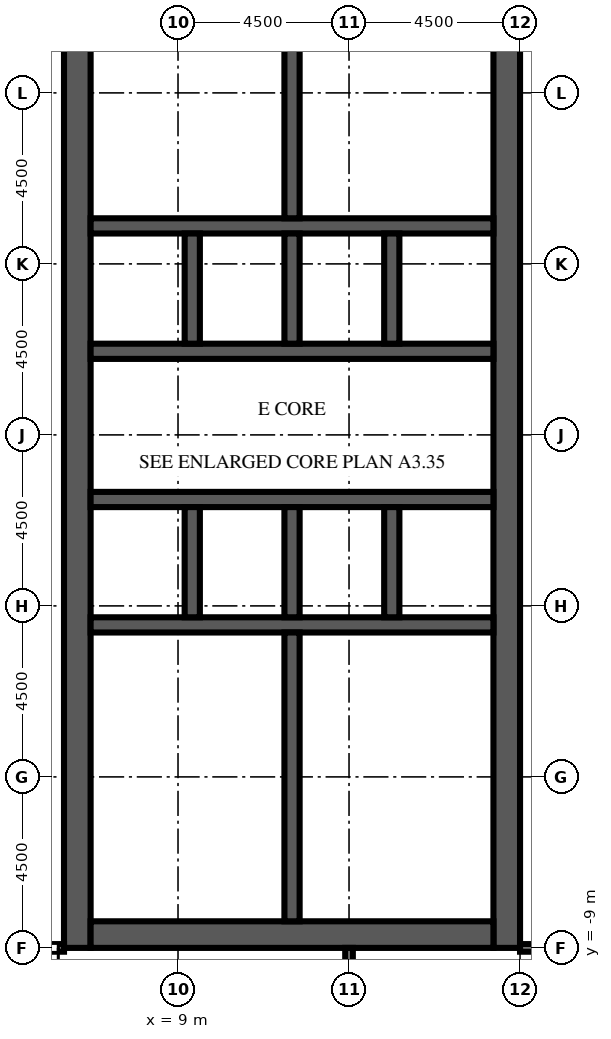
"""IFC4 building model, lengths in metres.
Left out: names, types, materials, properties, quantities, classifications, styles, units other than length and angle.
Written with IfcOpenShell. Run it as: python <this file> out.ifc"""

import sys

from ifc_helpers import new_model, si_unit, direction, frame, frame_2d, origin, place, context, subcontext, project, spatial, rectangle, extrude, element, fill, save


model = new_model("IFC4")
c1 = context("Model", 3, precision=1e-05, world=origin(), true_north=direction((0.0, 1.0)))
c2 = subcontext(c1, "Body", "Model", "MODEL_VIEW")
j1 = project(units=[si_unit("LENGTHUNIT", "METRE"), si_unit("PLANEANGLEUNIT", "RADIAN")], contexts=[c1])
p1 = place(None, origin())
s1 = spatial("IfcSite", under=j1, at=p1, CompositionType="ELEMENT")
p2 = place(p1, origin())
s2 = spatial("IfcBuilding", under=s1, at=p2, CompositionType="ELEMENT")
p3 = place(p2, frame((0.0, 0.0, 235.7)))
s3 = spatial("IfcBuildingStorey", under=s2, at=p3, CompositionType="ELEMENT", Elevation=235.7)
p4 = place(p3, frame((6.35, -9.0, 0.0), z_axis=(0.0, 0.0, 1.0), x_axis=(0.0, 1.0, 0.0)))
e1 = element("IfcWall", 1, at=p4, inside=s3, PredefinedType="SHEAR", context=c2, shape_type="SweptSolid", body=[
    extrude(rectangle(XDim=27.5, YDim=0.7, at=frame_2d((13.75, 0.0))), origin(), (0.0, 0.0, 1.0), 4.1),
])
p5 = place(p4, frame((12.55, 0.0, 0.0)))
e2 = element("IfcOpeningElement", 2, at=p5, cuts=e1, PredefinedType="OPENING", context=c2, shape_type="SweptSolid", body=[
    extrude(rectangle(XDim=2.4, YDim=2.4, at=frame_2d((1.2, 1.2))), frame((0.0, 0.36, 0.0), z_axis=(0.0, -1.0, 0.0), x_axis=(1.0, 0.0, 0.0)), (0.0, 0.0, 1.0), 0.72),
])
p6 = place(p4, frame((5.42, 0.0, 0.0)))
e3 = element("IfcOpeningElement", 3, at=p6, cuts=e1, PredefinedType="OPENING", context=c2, shape_type="SweptSolid", body=[
    extrude(rectangle(XDim=1.2, YDim=2.1, at=frame_2d((0.6, 1.05))), frame((0.0, 0.36, 0.0), z_axis=(0.0, -1.0, 0.0), x_axis=(1.0, 0.0, 0.0)), (0.0, 0.0, 1.0), 0.72),
])
p7 = place(p4, frame((19.46, 0.0, 0.0)))
e4 = element("IfcOpeningElement", 4, at=p7, cuts=e1, PredefinedType="OPENING", context=c2, shape_type="SweptSolid", body=[
    extrude(rectangle(XDim=1.0, YDim=2.1, at=frame_2d((0.5, 1.05))), frame((0.0, 0.36, 0.0), z_axis=(0.0, -1.0, 0.0), x_axis=(1.0, 0.0, 0.0)), (0.0, 0.0, 1.0), 0.72),
])
p8 = place(p4, frame((21.17, 0.0, 0.0)))
e5 = element("IfcOpeningElement", 5, at=p8, cuts=e1, PredefinedType="OPENING", context=c2, shape_type="SweptSolid", body=[
    extrude(rectangle(XDim=1.0, YDim=2.1, at=frame_2d((0.5, 1.05))), frame((0.0, 0.36, 0.0), z_axis=(0.0, -1.0, 0.0), x_axis=(1.0, 0.0, 0.0)), (0.0, 0.0, 1.0), 0.72),
])
p9 = place(p4, frame((23.26, 0.0, 0.0)))
e6 = element("IfcOpeningElement", 6, at=p9, cuts=e1, PredefinedType="OPENING", context=c2, shape_type="SweptSolid", body=[
    extrude(rectangle(XDim=1.0, YDim=2.1, at=frame_2d((0.5, 1.05))), frame((0.0, 0.36, 0.0), z_axis=(0.0, -1.0, 0.0), x_axis=(1.0, 0.0, 0.0)), (0.0, 0.0, 1.0), 0.72),
])
p10 = place(p4, frame((25.35, 0.0, 0.0)))
e7 = element("IfcOpeningElement", 7, at=p10, cuts=e1, PredefinedType="OPENING", context=c2, shape_type="SweptSolid", body=[
    extrude(rectangle(XDim=1.0, YDim=2.1, at=frame_2d((0.5, 1.05))), frame((0.0, 0.36, 0.0), z_axis=(0.0, -1.0, 0.0), x_axis=(1.0, 0.0, 0.0)), (0.0, 0.0, 1.0), 0.72),
])
p11 = place(p3, frame((17.65, -9.0, 0.0), z_axis=(0.0, 0.0, 1.0), x_axis=(0.0, 1.0, 0.0)))
e8 = element("IfcWall", 8, at=p11, inside=s3, PredefinedType="SHEAR", context=c2, shape_type="SweptSolid", body=[
    extrude(rectangle(XDim=27.5, YDim=0.7, at=frame_2d((13.75, 0.0))), origin(), (0.0, 0.0, 1.0), 4.1),
])
p12 = place(p11, frame((12.55, 0.0, 0.0)))
e9 = element("IfcOpeningElement", 9, at=p12, cuts=e8, PredefinedType="OPENING", context=c2, shape_type="SweptSolid", body=[
    extrude(rectangle(XDim=2.4, YDim=2.4, at=frame_2d((1.2, 1.2))), frame((0.0, 0.36, 0.0), z_axis=(0.0, -1.0, 0.0), x_axis=(1.0, 0.0, 0.0)), (0.0, 0.0, 1.0), 0.72),
])
p13 = place(p11, frame((6.825, 0.0, 0.0)))
e10 = element("IfcOpeningElement", 10, at=p13, cuts=e8, PredefinedType="OPENING", context=c2, shape_type="SweptSolid", body=[
    extrude(rectangle(XDim=1.2, YDim=2.1, at=frame_2d((0.6, 1.05))), frame((0.0, 0.36, 0.0), z_axis=(0.0, -1.0, 0.0), x_axis=(1.0, 0.0, 0.0)), (0.0, 0.0, 1.0), 0.72),
])
p14 = place(p11, frame((19.475, 0.0, 0.0)))
e11 = element("IfcOpeningElement", 11, at=p14, cuts=e8, PredefinedType="OPENING", context=c2, shape_type="SweptSolid", body=[
    extrude(rectangle(XDim=1.2, YDim=2.1, at=frame_2d((0.6, 1.05))), frame((0.0, 0.36, 0.0), z_axis=(0.0, -1.0, 0.0), x_axis=(1.0, 0.0, 0.0)), (0.0, 0.0, 1.0), 0.72),
])
p15 = place(p3, frame((6.7, -8.65, 0.0), z_axis=(0.0, 0.0, 1.0), x_axis=(1.0, 0.0, 0.0)))
e12 = element("IfcWall", 12, at=p15, inside=s3, PredefinedType="SHEAR", context=c2, shape_type="SweptSolid", body=[
    extrude(rectangle(XDim=10.6, YDim=0.7, at=frame_2d((5.3, 0.0))), origin(), (0.0, 0.0, 1.0), 4.1),
])
p16 = place(p3, frame((6.7, -0.5, 0.0), z_axis=(0.0, 0.0, 1.0), x_axis=(1.0, 0.0, 0.0)))
e13 = element("IfcWall", 13, at=p16, inside=s3, PredefinedType="SHEAR", context=c2, shape_type="SweptSolid", body=[
    extrude(rectangle(XDim=10.6, YDim=0.4, at=frame_2d((5.3, 0.0))), origin(), (0.0, 0.0, 1.0), 4.1),
])
p17 = place(p3, frame((6.7, 2.8, 0.0), z_axis=(0.0, 0.0, 1.0), x_axis=(1.0, 0.0, 0.0)))
e14 = element("IfcWall", 14, at=p17, inside=s3, PredefinedType="SHEAR", context=c2, shape_type="SweptSolid", body=[
    extrude(rectangle(XDim=10.6, YDim=0.4, at=frame_2d((5.3, 0.0))), origin(), (0.0, 0.0, 1.0), 4.1),
])
p18 = place(p17, frame((0.688, 0.0, 0.0)))
e15 = element("IfcOpeningElement", 15, at=p18, cuts=e14, PredefinedType="OPENING", context=c2, shape_type="SweptSolid", body=[
    extrude(rectangle(XDim=1.1, YDim=2.1, at=frame_2d((0.55, 1.05))), frame((0.0, 0.21, 0.0), z_axis=(0.0, -1.0, 0.0), x_axis=(1.0, 0.0, 0.0)), (0.0, 0.0, 1.0), 0.42),
])
p19 = place(p17, frame((3.438, 0.0, 0.0)))
e16 = element("IfcOpeningElement", 16, at=p19, cuts=e14, PredefinedType="OPENING", context=c2, shape_type="SweptSolid", body=[
    extrude(rectangle(XDim=1.1, YDim=2.1, at=frame_2d((0.55, 1.05))), frame((0.0, 0.21, 0.0), z_axis=(0.0, -1.0, 0.0), x_axis=(1.0, 0.0, 0.0)), (0.0, 0.0, 1.0), 0.42),
])
p20 = place(p17, frame((6.113, 0.0, 0.0)))
e17 = element("IfcOpeningElement", 17, at=p20, cuts=e14, PredefinedType="OPENING", context=c2, shape_type="SweptSolid", body=[
    extrude(rectangle(XDim=1.0, YDim=2.1, at=frame_2d((0.5, 1.05))), frame((0.0, 0.21, 0.0), z_axis=(0.0, -1.0, 0.0), x_axis=(1.0, 0.0, 0.0)), (0.0, 0.0, 1.0), 0.42),
])
p21 = place(p17, frame((8.863, 0.0, 0.0)))
e18 = element("IfcOpeningElement", 18, at=p21, cuts=e14, PredefinedType="OPENING", context=c2, shape_type="SweptSolid", body=[
    extrude(rectangle(XDim=1.0, YDim=2.1, at=frame_2d((0.5, 1.05))), frame((0.0, 0.21, 0.0), z_axis=(0.0, -1.0, 0.0), x_axis=(1.0, 0.0, 0.0)), (0.0, 0.0, 1.0), 0.42),
])
p22 = place(p3, frame((6.7, 6.7, 0.0), z_axis=(0.0, 0.0, 1.0), x_axis=(1.0, 0.0, 0.0)))
e19 = element("IfcWall", 19, at=p22, inside=s3, PredefinedType="SHEAR", context=c2, shape_type="SweptSolid", body=[
    extrude(rectangle(XDim=10.6, YDim=0.4, at=frame_2d((5.3, 0.0))), origin(), (0.0, 0.0, 1.0), 4.1),
])
p23 = place(p22, frame((3.438, 0.0, 0.0)))
e20 = element("IfcOpeningElement", 20, at=p23, cuts=e19, PredefinedType="OPENING", context=c2, shape_type="SweptSolid", body=[
    extrude(rectangle(XDim=1.1, YDim=2.1, at=frame_2d((0.55, 1.05))), frame((0.0, 0.21, 0.0), z_axis=(0.0, -1.0, 0.0), x_axis=(1.0, 0.0, 0.0)), (0.0, 0.0, 1.0), 0.42),
])
p24 = place(p22, frame((6.062, 0.0, 0.0)))
e21 = element("IfcOpeningElement", 21, at=p24, cuts=e19, PredefinedType="OPENING", context=c2, shape_type="SweptSolid", body=[
    extrude(rectangle(XDim=1.1, YDim=2.1, at=frame_2d((0.55, 1.05))), frame((0.0, 0.21, 0.0), z_axis=(0.0, -1.0, 0.0), x_axis=(1.0, 0.0, 0.0)), (0.0, 0.0, 1.0), 0.42),
])
p25 = place(p22, frame((8.812, 0.0, 0.0)))
e22 = element("IfcOpeningElement", 22, at=p25, cuts=e19, PredefinedType="OPENING", context=c2, shape_type="SweptSolid", body=[
    extrude(rectangle(XDim=1.1, YDim=2.1, at=frame_2d((0.55, 1.05))), frame((0.0, 0.21, 0.0), z_axis=(0.0, -1.0, 0.0), x_axis=(1.0, 0.0, 0.0)), (0.0, 0.0, 1.0), 0.42),
])
p26 = place(p22, frame((0.738, 0.0, 0.0)))
e23 = element("IfcOpeningElement", 23, at=p26, cuts=e19, PredefinedType="OPENING", context=c2, shape_type="SweptSolid", body=[
    extrude(rectangle(XDim=1.0, YDim=2.1, at=frame_2d((0.5, 1.05))), frame((0.0, 0.21, 0.0), z_axis=(0.0, -1.0, 0.0), x_axis=(1.0, 0.0, 0.0)), (0.0, 0.0, 1.0), 0.42),
])
p27 = place(p3, frame((6.7, 10.0, 0.0), z_axis=(0.0, 0.0, 1.0), x_axis=(1.0, 0.0, 0.0)))
e24 = element("IfcWall", 24, at=p27, inside=s3, PredefinedType="SHEAR", context=c2, shape_type="SweptSolid", body=[
    extrude(rectangle(XDim=10.6, YDim=0.4, at=frame_2d((5.3, 0.0))), origin(), (0.0, 0.0, 1.0), 4.1),
])
for number, where, z_axis, x_axis in (
    (25, (9.375, -0.3, 0.0), (0.0, 0.0, 1.0), (0.0, 1.0, 0.0)),
    (26, (9.375, 6.9, 0.0), (0.0, 0.0, 1.0), (0.0, 1.0, 0.0)),
    (27, (12.0, -0.3, 0.0), (0.0, 0.0, 1.0), (0.0, 1.0, 0.0)),
    (28, (12.0, 6.9, 0.0), (0.0, 0.0, 1.0), (0.0, 1.0, 0.0)),
    (29, (14.625, -0.3, 0.0), (0.0, 0.0, 1.0), (0.0, 1.0, 0.0)),
    (30, (14.625, 6.9, 0.0), (0.0, 0.0, 1.0), (0.0, 1.0, 0.0)),
):
    element("IfcWall", number, at=place(p3, frame(where, z_axis=z_axis, x_axis=x_axis)), inside=s3, PredefinedType="SHEAR", context=c2, shape_type="SweptSolid", body=[
        extrude(rectangle(XDim=2.9, YDim=0.4, at=frame_2d((1.45, 0.0))), origin(), (0.0, 0.0, 1.0), 4.1),
    ])
for number, where, z_axis, x_axis in (
    (31, (12.0, -8.3, 0.0), (0.0, 0.0, 1.0), (0.0, 1.0, 0.0)),
    (32, (12.0, 10.2, 0.0), (0.0, 0.0, 1.0), (0.0, 1.0, 0.0)),
):
    element("IfcWall", number, at=place(p3, frame(where, z_axis=z_axis, x_axis=x_axis)), inside=s3, PredefinedType="SHEAR", context=c2, shape_type="SweptSolid", body=[
        extrude(rectangle(XDim=7.6, YDim=0.4, at=frame_2d((3.8, 0.0))), origin(), (0.0, 0.0, 1.0), 4.1),
    ])
p28 = place(p3, frame((6.7, -5.26, 0.0), z_axis=(0.0, 0.0, 1.0), x_axis=(1.0, 0.0, 0.0)))
e33 = element("IfcWall", 33, at=p28, inside=s3, PredefinedType="PARTITIONING", context=c2, shape_type="SweptSolid", body=[
    extrude(rectangle(XDim=1.5, YDim=0.1, at=frame_2d((0.75, 0.0))), origin(), (0.0, 0.0, 1.0), 3.65),
])
p29 = place(p28, frame((0.25, 0.0, 0.0)))
e34 = element("IfcOpeningElement", 34, at=p29, cuts=e33, PredefinedType="OPENING", context=c2, shape_type="SweptSolid", body=[
    extrude(rectangle(XDim=1.0, YDim=2.1, at=frame_2d((0.5, 1.05))), frame((0.0, 0.06, 0.0), z_axis=(0.0, -1.0, 0.0), x_axis=(1.0, 0.0, 0.0)), (0.0, 0.0, 1.0), 0.12),
])
p30 = place(p3, frame((8.2, -5.26, 0.0), z_axis=(0.0, 0.0, 1.0), x_axis=(0.0, 1.0, 0.0)))
e35 = element("IfcWall", 35, at=p30, inside=s3, PredefinedType="PARTITIONING", context=c2, shape_type="SweptSolid", body=[
    extrude(rectangle(XDim=2.28, YDim=0.1, at=frame_2d((1.14, 0.0))), origin(), (0.0, 0.0, 1.0), 3.65),
])
p31 = place(p30, frame((0.64, 0.0, 0.0)))
e36 = element("IfcOpeningElement", 36, at=p31, cuts=e35, PredefinedType="OPENING", context=c2, shape_type="SweptSolid", body=[
    extrude(rectangle(XDim=1.0, YDim=2.1, at=frame_2d((0.5, 1.05))), frame((0.0, 0.06, 0.0), z_axis=(0.0, -1.0, 0.0), x_axis=(1.0, 0.0, 0.0)), (0.0, 0.0, 1.0), 0.12),
])
p32 = place(p3, frame((8.2, -2.98, 0.0), z_axis=(0.0, 0.0, 1.0), x_axis=(0.0, 1.0, 0.0)))
e37 = element("IfcWall", 37, at=p32, inside=s3, PredefinedType="PARTITIONING", context=c2, shape_type="SweptSolid", body=[
    extrude(rectangle(XDim=2.28, YDim=0.1, at=frame_2d((1.14, 0.0))), origin(), (0.0, 0.0, 1.0), 3.65),
])
p33 = place(p32, frame((0.64, 0.0, 0.0)))
e38 = element("IfcOpeningElement", 38, at=p33, cuts=e37, PredefinedType="OPENING", context=c2, shape_type="SweptSolid", body=[
    extrude(rectangle(XDim=1.0, YDim=2.1, at=frame_2d((0.5, 1.05))), frame((0.0, 0.06, 0.0), z_axis=(0.0, -1.0, 0.0), x_axis=(1.0, 0.0, 0.0)), (0.0, 0.0, 1.0), 0.12),
])
for number, where, z_axis, x_axis in (
    (39, (8.2, -5.26, 0.0), (0.0, 0.0, 1.0), (1.0, 0.0, 0.0)),
    (40, (8.2, -2.98, 0.0), (0.0, 0.0, 1.0), (1.0, 0.0, 0.0)),
):
    element("IfcWall", number, at=place(p3, frame(where, z_axis=z_axis, x_axis=x_axis)), inside=s3, PredefinedType="PARTITIONING", context=c2, shape_type="SweptSolid", body=[
        extrude(rectangle(XDim=3.6, YDim=0.1, at=frame_2d((1.8, 0.0))), origin(), (0.0, 0.0, 1.0), 3.65),
    ])
for number, where, z_axis, x_axis in (
    (41, (6.7, 11.72, 0.0), (0.0, 0.0, 1.0), (1.0, 0.0, 0.0)),
    (42, (6.7, 13.62, 0.0), (0.0, 0.0, 1.0), (1.0, 0.0, 0.0)),
):
    element("IfcWall", number, at=place(p3, frame(where, z_axis=z_axis, x_axis=x_axis)), inside=s3, PredefinedType="PARTITIONING", context=c2, shape_type="SweptSolid", body=[
        extrude(rectangle(XDim=5.1, YDim=0.1, at=frame_2d((2.55, 0.0))), origin(), (0.0, 0.0, 1.0), 3.65),
    ])
p34 = place(p3, frame((13.5, -22.1, 0.0), z_axis=(0.0, 0.0, 1.0), x_axis=(0.0, 1.0, 0.0)))
e43 = element("IfcWall", 43, at=p34, inside=s3, PredefinedType="PARTITIONING", context=c2, shape_type="SweptSolid", body=[
    extrude(rectangle(XDim=13.1, YDim=0.2, at=frame_2d((6.55, 0.0))), origin(), (0.0, 0.0, 1.0), 3.65),
])
p35 = place(p3, frame((6.0, -9.0, 0.0), z_axis=(0.0, 0.0, 1.0), x_axis=(-1.0, 0.0, 0.0)))
e44 = element("IfcWall", 44, at=p35, inside=s3, PredefinedType="PARTITIONING", context=c2, shape_type="SweptSolid", body=[
    extrude(rectangle(XDim=4.5, YDim=0.2, at=frame_2d((2.25, 0.0))), origin(), (0.0, 0.0, 1.0), 3.65),
])
p36 = place(p35, frame((1.9, 0.0, 0.0)))
e45 = element("IfcOpeningElement", 45, at=p36, cuts=e44, PredefinedType="OPENING", context=c2, shape_type="SweptSolid", body=[
    extrude(rectangle(XDim=1.0, YDim=2.1, at=frame_2d((0.5, 1.05))), frame((0.0, 0.11, 0.0), z_axis=(0.0, -1.0, 0.0), x_axis=(1.0, 0.0, 0.0)), (0.0, 0.0, 1.0), 0.22),
])
p37 = place(p35, frame((0.15, 0.0, 0.0)))
e46 = element("IfcOpeningElement", 46, at=p37, cuts=e44, PredefinedType="OPENING", context=c2, shape_type="SweptSolid", body=[
    extrude(rectangle(XDim=1.0, YDim=2.1, at=frame_2d((0.5, 1.05))), frame((0.0, 0.11, 0.0), z_axis=(0.0, -1.0, 0.0), x_axis=(1.0, 0.0, 0.0)), (0.0, 0.0, 1.0), 0.22),
])
p38 = place(p3, frame((21.0, -9.0, 0.0), z_axis=(0.0, 0.0, 1.0), x_axis=(-1.0, 0.0, 0.0)))
e47 = element("IfcWall", 47, at=p38, inside=s3, PredefinedType="PARTITIONING", context=c2, shape_type="SweptSolid", body=[
    extrude(rectangle(XDim=3.0, YDim=0.2, at=frame_2d((1.5, 0.0))), origin(), (0.0, 0.0, 1.0), 3.65),
])
p39 = place(p38, frame((1.4, 0.0, 0.0)))
e48 = element("IfcOpeningElement", 48, at=p39, cuts=e47, PredefinedType="OPENING", context=c2, shape_type="SweptSolid", body=[
    extrude(rectangle(XDim=1.0, YDim=2.1, at=frame_2d((0.5, 1.05))), frame((0.0, 0.11, 0.0), z_axis=(0.0, -1.0, 0.0), x_axis=(1.0, 0.0, 0.0)), (0.0, 0.0, 1.0), 0.22),
])
p40 = place(p18, origin())
e49 = element("IfcDoor", 49, at=p40, inside=s3, OperationType="DOUBLE_DOOR_SLIDING", PredefinedType="DOOR", context=c2, shape_type="SweptSolid", body=[
    extrude(rectangle(XDim=1.1, YDim=2.1, at=frame_2d((0.55, 1.05))), frame((0.0, 0.025, 0.0), z_axis=(0.0, -1.0, 0.0), x_axis=(1.0, 0.0, 0.0)), (0.0, 0.0, 1.0), 0.05),
])
fill(e15, e49)
p41 = place(p19, origin())
e50 = element("IfcDoor", 50, at=p41, inside=s3, OperationType="DOUBLE_DOOR_SLIDING", PredefinedType="DOOR", context=c2, shape_type="SweptSolid", body=[
    extrude(rectangle(XDim=1.1, YDim=2.1, at=frame_2d((0.55, 1.05))), frame((0.0, 0.025, 0.0), z_axis=(0.0, -1.0, 0.0), x_axis=(1.0, 0.0, 0.0)), (0.0, 0.0, 1.0), 0.05),
])
fill(e16, e50)
p42 = place(p23, origin())
e51 = element("IfcDoor", 51, at=p42, inside=s3, OperationType="DOUBLE_DOOR_SLIDING", PredefinedType="DOOR", context=c2, shape_type="SweptSolid", body=[
    extrude(rectangle(XDim=1.1, YDim=2.1, at=frame_2d((0.55, 1.05))), frame((0.0, 0.025, 0.0), z_axis=(0.0, -1.0, 0.0), x_axis=(1.0, 0.0, 0.0)), (0.0, 0.0, 1.0), 0.05),
])
fill(e20, e51)
p43 = place(p24, origin())
e52 = element("IfcDoor", 52, at=p43, inside=s3, OperationType="DOUBLE_DOOR_SLIDING", PredefinedType="DOOR", context=c2, shape_type="SweptSolid", body=[
    extrude(rectangle(XDim=1.1, YDim=2.1, at=frame_2d((0.55, 1.05))), frame((0.0, 0.025, 0.0), z_axis=(0.0, -1.0, 0.0), x_axis=(1.0, 0.0, 0.0)), (0.0, 0.0, 1.0), 0.05),
])
fill(e21, e52)
p44 = place(p25, origin())
e53 = element("IfcDoor", 53, at=p44, inside=s3, OperationType="DOUBLE_DOOR_SLIDING", PredefinedType="DOOR", context=c2, shape_type="SweptSolid", body=[
    extrude(rectangle(XDim=1.1, YDim=2.1, at=frame_2d((0.55, 1.05))), frame((0.0, 0.025, 0.0), z_axis=(0.0, -1.0, 0.0), x_axis=(1.0, 0.0, 0.0)), (0.0, 0.0, 1.0), 0.05),
])
fill(e22, e53)
p45 = place(p5, origin())
e54 = element("IfcDoor", 54, at=p45, inside=s3, OperationType="DOUBLE_DOOR_DOUBLE_SWING", PredefinedType="DOOR", context=c2, shape_type="SweptSolid", body=[
    extrude(rectangle(XDim=2.4, YDim=2.4, at=frame_2d((1.2, 1.2))), frame((0.0, 0.025, 0.0), z_axis=(0.0, -1.0, 0.0), x_axis=(1.0, 0.0, 0.0)), (0.0, 0.0, 1.0), 0.05),
])
fill(e2, e54)
p46 = place(p12, origin())
e55 = element("IfcDoor", 55, at=p46, inside=s3, OperationType="DOUBLE_DOOR_DOUBLE_SWING", PredefinedType="DOOR", context=c2, shape_type="SweptSolid", body=[
    extrude(rectangle(XDim=2.4, YDim=2.4, at=frame_2d((1.2, 1.2))), frame((0.0, 0.025, 0.0), z_axis=(0.0, -1.0, 0.0), x_axis=(1.0, 0.0, 0.0)), (0.0, 0.0, 1.0), 0.05),
])
fill(e9, e55)
p47 = place(p13, frame((1.2, 0.0, 0.0), z_axis=(0.0, 0.0, 1.0), x_axis=(-1.0, 0.0, 0.0)))
e56 = element("IfcDoor", 56, at=p47, inside=s3, OperationType="SINGLE_SWING_LEFT", PredefinedType="DOOR", context=c2, shape_type="SweptSolid", body=[
    extrude(rectangle(XDim=1.2, YDim=2.1, at=frame_2d((0.6, 1.05))), frame((0.0, 0.025, 0.0), z_axis=(0.0, -1.0, 0.0), x_axis=(1.0, 0.0, 0.0)), (0.0, 0.0, 1.0), 0.05),
])
fill(e10, e56)
p48 = place(p14, frame((1.2, 0.0, 0.0), z_axis=(0.0, 0.0, 1.0), x_axis=(-1.0, 0.0, 0.0)))
e57 = element("IfcDoor", 57, at=p48, inside=s3, OperationType="SINGLE_SWING_LEFT", PredefinedType="DOOR", context=c2, shape_type="SweptSolid", body=[
    extrude(rectangle(XDim=1.2, YDim=2.1, at=frame_2d((0.6, 1.05))), frame((0.0, 0.025, 0.0), z_axis=(0.0, -1.0, 0.0), x_axis=(1.0, 0.0, 0.0)), (0.0, 0.0, 1.0), 0.05),
])
fill(e11, e57)
p49 = place(p20, origin())
e58 = element("IfcDoor", 58, at=p49, inside=s3, OperationType="SINGLE_SWING_LEFT", PredefinedType="DOOR", context=c2, shape_type="SweptSolid", body=[
    extrude(rectangle(XDim=1.0, YDim=2.1, at=frame_2d((0.5, 1.05))), frame((0.0, 0.025, 0.0), z_axis=(0.0, -1.0, 0.0), x_axis=(1.0, 0.0, 0.0)), (0.0, 0.0, 1.0), 0.05),
])
fill(e17, e58)
p50 = place(p21, origin())
e59 = element("IfcDoor", 59, at=p50, inside=s3, OperationType="SINGLE_SWING_RIGHT", PredefinedType="DOOR", context=c2, shape_type="SweptSolid", body=[
    extrude(rectangle(XDim=1.0, YDim=2.1, at=frame_2d((0.5, 1.05))), frame((0.0, 0.025, 0.0), z_axis=(0.0, -1.0, 0.0), x_axis=(1.0, 0.0, 0.0)), (0.0, 0.0, 1.0), 0.05),
])
fill(e18, e59)
p51 = place(p26, origin())
e60 = element("IfcDoor", 60, at=p51, inside=s3, OperationType="SINGLE_SWING_LEFT", PredefinedType="DOOR", context=c2, shape_type="SweptSolid", body=[
    extrude(rectangle(XDim=1.0, YDim=2.1, at=frame_2d((0.5, 1.05))), frame((0.0, 0.025, 0.0), z_axis=(0.0, -1.0, 0.0), x_axis=(1.0, 0.0, 0.0)), (0.0, 0.0, 1.0), 0.05),
])
fill(e23, e60)
p52 = place(p6, origin())
e61 = element("IfcDoor", 61, at=p52, inside=s3, OperationType="SINGLE_SWING_RIGHT", PredefinedType="DOOR", context=c2, shape_type="SweptSolid", body=[
    extrude(rectangle(XDim=1.2, YDim=2.1, at=frame_2d((0.6, 1.05))), frame((0.0, -0.275, 0.0), z_axis=(0.0, -1.0, 0.0), x_axis=(1.0, 0.0, 0.0)), (0.0, 0.0, 1.0), 0.05),
])
fill(e3, e61)
p53 = place(p29, origin())
e62 = element("IfcDoor", 62, at=p53, inside=s3, OperationType="SINGLE_SWING_LEFT", PredefinedType="DOOR", context=c2, shape_type="SweptSolid", body=[
    extrude(rectangle(XDim=1.0, YDim=2.1, at=frame_2d((0.5, 1.05))), frame((0.0, 0.025, 0.0), z_axis=(0.0, -1.0, 0.0), x_axis=(1.0, 0.0, 0.0)), (0.0, 0.0, 1.0), 0.05),
])
fill(e34, e62)
p54 = place(p31, origin())
e63 = element("IfcDoor", 63, at=p54, inside=s3, OperationType="SINGLE_SWING_RIGHT", PredefinedType="DOOR", context=c2, shape_type="SweptSolid", body=[
    extrude(rectangle(XDim=1.0, YDim=2.1, at=frame_2d((0.5, 1.05))), frame((0.0, 0.025, 0.0), z_axis=(0.0, -1.0, 0.0), x_axis=(1.0, 0.0, 0.0)), (0.0, 0.0, 1.0), 0.05),
])
fill(e36, e63)
p55 = place(p33, origin())
e64 = element("IfcDoor", 64, at=p55, inside=s3, OperationType="SINGLE_SWING_LEFT", PredefinedType="DOOR", context=c2, shape_type="SweptSolid", body=[
    extrude(rectangle(XDim=1.0, YDim=2.1, at=frame_2d((0.5, 1.05))), frame((0.0, 0.025, 0.0), z_axis=(0.0, -1.0, 0.0), x_axis=(1.0, 0.0, 0.0)), (0.0, 0.0, 1.0), 0.05),
])
fill(e38, e64)
p56 = place(p7, origin())
e65 = element("IfcDoor", 65, at=p56, inside=s3, OperationType="SINGLE_SWING_RIGHT", PredefinedType="DOOR", context=c2, shape_type="SweptSolid", body=[
    extrude(rectangle(XDim=1.0, YDim=2.1, at=frame_2d((0.5, 1.05))), frame((0.0, -0.275, 0.0), z_axis=(0.0, -1.0, 0.0), x_axis=(1.0, 0.0, 0.0)), (0.0, 0.0, 1.0), 0.05),
])
fill(e4, e65)
p57 = place(p8, origin())
e66 = element("IfcDoor", 66, at=p57, inside=s3, OperationType="SINGLE_SWING_LEFT", PredefinedType="DOOR", context=c2, shape_type="SweptSolid", body=[
    extrude(rectangle(XDim=1.0, YDim=2.1, at=frame_2d((0.5, 1.05))), frame((0.0, -0.275, 0.0), z_axis=(0.0, -1.0, 0.0), x_axis=(1.0, 0.0, 0.0)), (0.0, 0.0, 1.0), 0.05),
])
fill(e5, e66)
p58 = place(p9, origin())
e67 = element("IfcDoor", 67, at=p58, inside=s3, OperationType="SINGLE_SWING_RIGHT", PredefinedType="DOOR", context=c2, shape_type="SweptSolid", body=[
    extrude(rectangle(XDim=1.0, YDim=2.1, at=frame_2d((0.5, 1.05))), frame((0.0, -0.275, 0.0), z_axis=(0.0, -1.0, 0.0), x_axis=(1.0, 0.0, 0.0)), (0.0, 0.0, 1.0), 0.05),
])
fill(e6, e67)
p59 = place(p37, origin())
e68 = element("IfcDoor", 68, at=p59, inside=s3, OperationType="SINGLE_SWING_LEFT", PredefinedType="DOOR", context=c2, shape_type="SweptSolid", body=[
    extrude(rectangle(XDim=1.0, YDim=2.1, at=frame_2d((0.5, 1.05))), frame((0.0, 0.025, 0.0), z_axis=(0.0, -1.0, 0.0), x_axis=(1.0, 0.0, 0.0)), (0.0, 0.0, 1.0), 0.05),
])
fill(e46, e68)
save(model, sys.argv[1])
